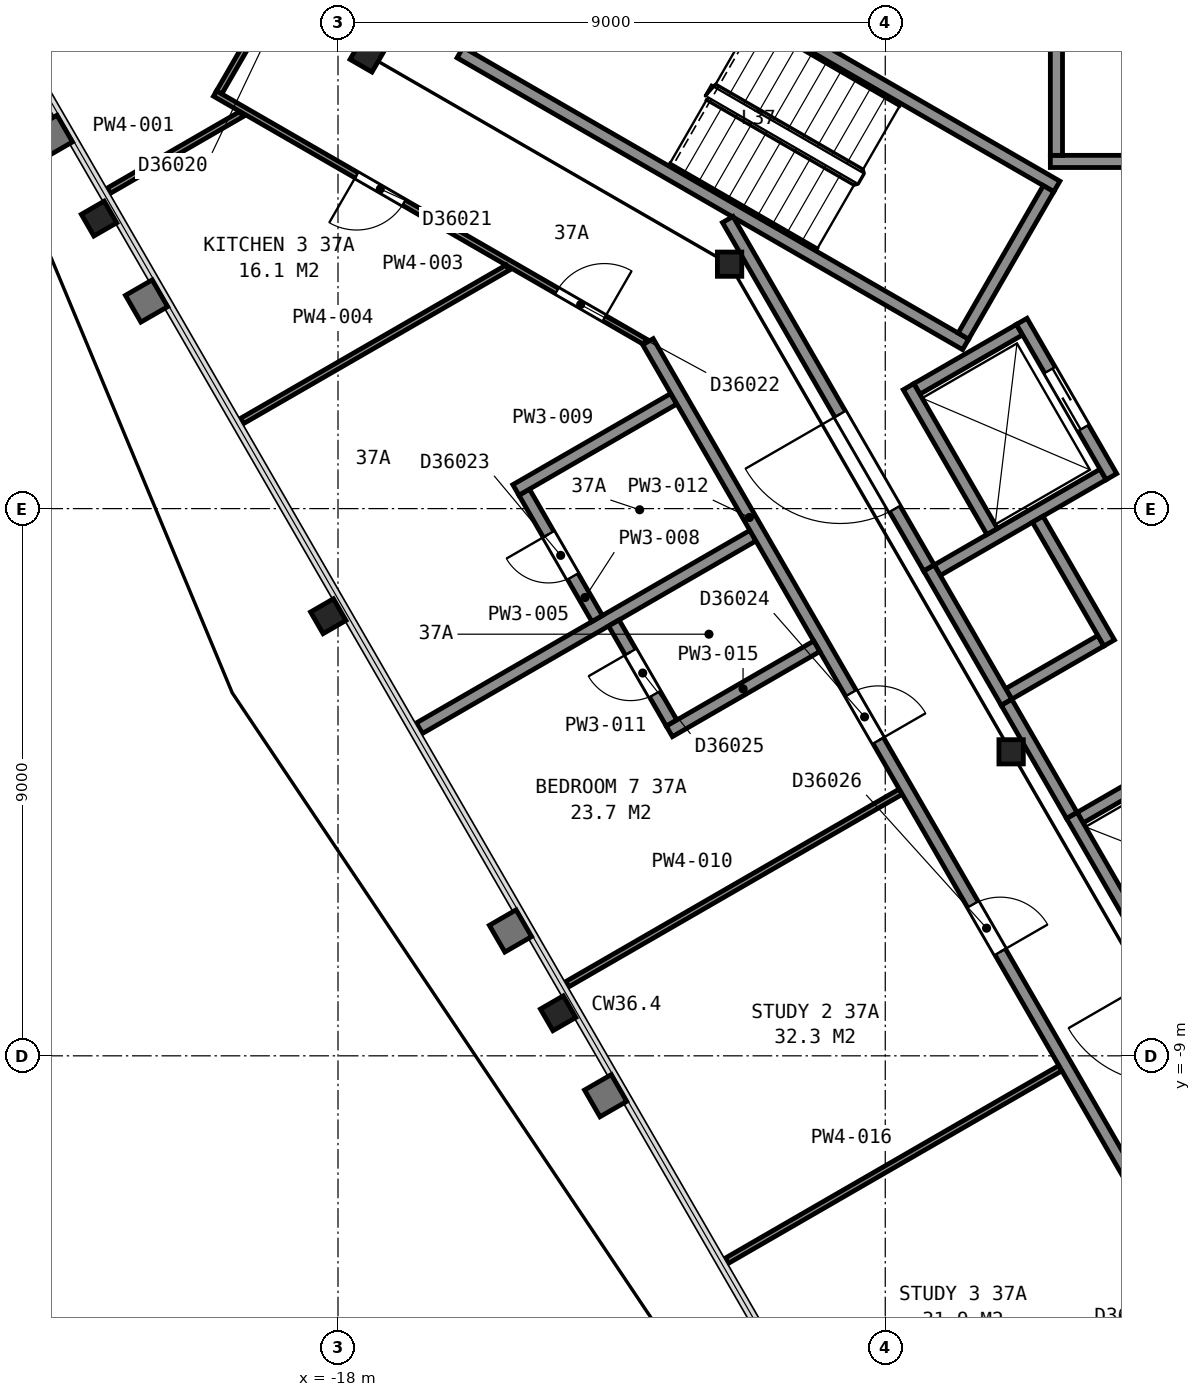
"""IFC4 building model, lengths in metres.
Left out: names, types, materials, properties, quantities, classifications, styles, units other than length and angle.
Written with IfcOpenShell. Run it as: python <this file> out.ifc"""

import sys

from ifc_helpers import new_model, si_unit, direction, frame, frame_2d, origin, origin_2d, place, context, subcontext, project, spatial, rectangle, i_section, extrude, element, fill, save


model = new_model("IFC4")
c1 = context("Model", 3, precision=1e-05, world=origin(), true_north=direction((0.0, 1.0)))
c2 = subcontext(c1, "Body", "Model", "MODEL_VIEW")
j1 = project(units=[si_unit("LENGTHUNIT", "METRE"), si_unit("PLANEANGLEUNIT", "RADIAN")], contexts=[c1])
p1 = place(None, origin())
s1 = spatial("IfcSite", under=j1, at=p1, CompositionType="ELEMENT")
p2 = place(p1, origin())
s2 = spatial("IfcBuilding", under=s1, at=p2, CompositionType="ELEMENT")
p3 = place(p2, frame((0.0, 0.0, 152.5)))
s3 = spatial("IfcBuildingStorey", under=s2, at=p3, CompositionType="ELEMENT", Elevation=152.5)
p4 = place(p3, frame((-21.93, 4.77, 0.0), z_axis=(0.0, 0.0, 1.0), x_axis=(-0.5, 0.866025403784, 0.0)))
e1 = element("IfcColumn", 1, at=p4, inside=s3, PredefinedType="COLUMN", context=c2, shape_type="SweptSolid", body=[
    extrude(i_section(OverallWidth=0.411, OverallDepth=0.434, WebThickness=0.036, FlangeThickness=0.057, FilletRadius=0.015, at=origin_2d()), origin(), (0.0, 0.0, 1.0), 3.66),
])
for number, where, z_axis, x_axis in (
    (2, (-18.16, -1.77, 0.0), (0.0, 0.0, 1.0), (-0.5, 0.866, 0.0)),
    (3, (-14.38, -8.3, 0.0), (0.0, 0.0, 1.0), (-0.5, 0.866, 0.0)),
):
    element("IfcColumn", number, at=place(p3, frame(where, z_axis=z_axis, x_axis=x_axis)), inside=s3, PredefinedType="COLUMN", context=c2, shape_type="SweptSolid", body=[
        extrude(i_section(OverallWidth=0.411, OverallDepth=0.434, WebThickness=0.036, FlangeThickness=0.057, FilletRadius=0.015, at=origin_2d()), origin(), (0.0, 0.0, 1.0), 3.665),
    ])
p5 = place(p3, frame((-17.52, 7.46, 0.0), z_axis=(0.0, 0.0, 1.0), x_axis=(0.5, 0.866025403784, 0.0)))
e4 = element("IfcColumn", 4, at=p5, inside=s3, PredefinedType="COLUMN", context=c2, shape_type="SweptSolid", body=[
    extrude(i_section(OverallWidth=0.406, OverallDepth=0.417, WebThickness=0.03, FlangeThickness=0.048, FilletRadius=0.015, at=origin_2d()), origin(), (0.0, 0.0, 1.0), 3.7),
])
for number, where, z_axis, x_axis in (
    (5, (-11.56, 4.02, 0.0), (0.0, 0.0, 1.0), (1.0, 0.0, 0.0)),
    (6, (-6.93, -4.0, 0.0), (0.0, 0.0, 1.0), (1.0, 0.0, 0.0)),
):
    element("IfcColumn", number, at=place(p3, frame(where, z_axis=z_axis, x_axis=x_axis)), inside=s3, PredefinedType="COLUMN", context=c2, shape_type="SweptSolid", body=[
        extrude(i_section(OverallWidth=0.401, OverallDepth=0.399, WebThickness=0.025, FlangeThickness=0.04, FilletRadius=0.015, at=origin_2d()), origin(), (0.0, 0.0, 1.0), 3.7),
    ])
p6 = place(p3, frame((-14.455, 9.962, 0.0), z_axis=(0.0, 0.0, 1.0), x_axis=(-0.500049511043, -0.865996816683, 0.0)))
e7 = element("IfcWall", 7, at=p6, inside=s3, PredefinedType="PARTITIONING", context=c2, shape_type="SweptSolid", body=[
    extrude(rectangle(XDim=2.8, YDim=0.2, at=frame_2d((1.4, 0.0))), origin(), (0.0, 0.0, 1.0), 3.45),
])
p7 = place(p6, frame((0.85, 0.0, 0.0)))
e8 = element("IfcOpeningElement", 8, at=p7, cuts=e7, PredefinedType="OPENING", context=c2, shape_type="SweptSolid", body=[
    extrude(rectangle(XDim=1.1, YDim=2.1, at=frame_2d((0.55, 1.05))), frame((0.0, 0.11, 0.0), z_axis=(0.0, -1.0, 0.0), x_axis=(1.0, 0.0, 0.0)), (0.0, 0.0, 1.0), 0.22),
])
for number, where, z_axis, x_axis in (
    (9, (-7.678, 2.701, 0.0), (0.0, 0.0, 1.0), (-0.866, 0.5, 0.0)),
    (10, (-6.178, 5.299, 0.0), (0.0, 0.0, 1.0), (-0.866, 0.5, 0.0)),
):
    element("IfcWall", number, at=place(p3, frame(where, z_axis=z_axis, x_axis=x_axis)), inside=s3, PredefinedType="PARTITIONING", context=c2, shape_type="SweptSolid", body=[
        extrude(rectangle(XDim=9.6, YDim=0.2, at=frame_2d((4.8, 0.0))), origin(), (0.0, 0.0, 1.0), 3.45),
    ])
p8 = place(p3, frame((-6.315, 5.262, 0.0), z_axis=(0.0, 0.0, 1.0), x_axis=(-0.500049511043, -0.865996816683, 0.0)))
e11 = element("IfcWall", 11, at=p8, inside=s3, PredefinedType="PARTITIONING", context=c2, shape_type="SweptSolid", body=[
    extrude(rectangle(XDim=2.8, YDim=0.2, at=frame_2d((1.4, 0.0))), origin(), (0.0, 0.0, 1.0), 3.45),
])
p9 = place(p3, frame((-6.285, 5.71, 0.0), z_axis=(0.0, 0.0, 1.0), x_axis=(1.0, 0.0, 0.0)))
e12 = element("IfcWall", 12, at=p9, inside=s3, PredefinedType="PARTITIONING", context=c2, shape_type="SweptSolid", body=[
    extrude(rectangle(XDim=2.35, YDim=0.2, at=frame_2d((1.175, 0.0))), origin(), (0.0, 0.0, 1.0), 3.7),
])
for number, where, z_axis, x_axis in (
    (13, (-5.795, -5.083, 0.0), (0.0, 0.0, 1.0), (0.866, 0.5, 0.0)),
    (14, (-6.97, -3.048, 0.0), (0.0, 0.0, 1.0), (0.866, 0.5, 0.0)),
):
    element("IfcWall", number, at=place(p3, frame(where, z_axis=z_axis, x_axis=x_axis)), inside=s3, PredefinedType="PARTITIONING", context=c2, shape_type="SweptSolid", body=[
        extrude(rectangle(XDim=1.75, YDim=0.2, at=frame_2d((0.875, 0.0))), origin(), (0.0, 0.0, 1.0), 3.7),
    ])
p10 = place(p3, frame((-8.145, -1.013, 0.0), z_axis=(0.0, 0.0, 1.0), x_axis=(0.866016494683, 0.500015430699, 0.0)))
e15 = element("IfcWall", 15, at=p10, inside=s3, PredefinedType="PARTITIONING", context=c2, shape_type="SweptSolid", body=[
    extrude(rectangle(XDim=3.15, YDim=0.2, at=frame_2d((1.575, 0.0))), origin(), (0.0, 0.0, 1.0), 3.7),
])
p11 = place(p3, frame((-8.48, 1.969, 0.0), z_axis=(0.0, 0.0, 1.0), x_axis=(0.866000020948, 0.500043961785, 0.0)))
e16 = element("IfcWall", 16, at=p11, inside=s3, PredefinedType="PARTITIONING", context=c2, shape_type="SweptSolid", body=[
    extrude(rectangle(XDim=1.95, YDim=0.2, at=frame_2d((0.975, 0.0))), origin(), (0.0, 0.0, 1.0), 3.7),
])
p12 = place(p3, frame((-6.185, 5.81, 0.0), z_axis=(0.0, 0.0, 1.0), x_axis=(0.0, 1.0, 0.0)))
e17 = element("IfcWall", 17, at=p12, inside=s3, PredefinedType="PARTITIONING", context=c2, shape_type="SweptSolid", body=[
    extrude(rectangle(XDim=1.75, YDim=0.2, at=frame_2d((0.875, 0.0))), origin(), (0.0, 0.0, 1.0), 3.7),
])
p13 = place(p3, frame((-5.28, 0.525, 0.0), z_axis=(0.0, 0.0, 1.0), x_axis=(-0.500037662692, 0.866003658127, 0.0)))
e18 = element("IfcWall", 18, at=p13, inside=s3, PredefinedType="PARTITIONING", context=c2, shape_type="SweptSolid", body=[
    extrude(rectangle(XDim=2.95, YDim=0.2, at=frame_2d((1.475, 0.0))), origin(), (0.0, 0.0, 1.0), 3.7),
])
p14 = place(p13, frame((0.925, 0.0, 0.0)))
e19 = element("IfcOpeningElement", 19, at=p14, cuts=e18, PredefinedType="OPENING", context=c2, shape_type="SweptSolid", body=[
    extrude(rectangle(XDim=1.1, YDim=2.1, at=frame_2d((0.55, 1.05))), frame((0.0, 0.11, 0.0), z_axis=(0.0, -1.0, 0.0), x_axis=(1.0, 0.0, 0.0)), (0.0, 0.0, 1.0), 0.22),
])
p15 = place(p3, frame((-5.318, -2.21, 0.0), z_axis=(0.0, 0.0, 1.0), x_axis=(-0.499938297808, 0.866061024631, 0.0)))
e20 = element("IfcWall", 20, at=p15, inside=s3, PredefinedType="PARTITIONING", context=c2, shape_type="SweptSolid", body=[
    extrude(rectangle(XDim=2.35, YDim=0.2, at=frame_2d((1.175, 0.0))), origin(), (0.0, 0.0, 1.0), 3.7),
])
p16 = place(p3, frame((-7.242, -0.376, 0.0), z_axis=(0.0, 0.0, 1.0), x_axis=(-0.499996545922, 0.866027397988, 0.0)))
e21 = element("IfcWall", 21, at=p16, inside=s3, PredefinedType="PARTITIONING", context=c2, shape_type="SweptSolid", body=[
    extrude(rectangle(XDim=2.75, YDim=0.2, at=frame_2d((1.375, 0.0))), origin(), (0.0, 0.0, 1.0), 3.7),
])
for number, where, z_axis, x_axis in (
    (22, (-4.656, -7.255, 0.0), (0.0, 0.0, 1.0), (-0.5, 0.866, 0.0)),
    (23, (-7.006, -3.185, 0.0), (0.0, 0.0, 1.0), (-0.5, 0.866, 0.0)),
):
    element("IfcWall", number, at=place(p3, frame(where, z_axis=z_axis, x_axis=x_axis)), inside=s3, PredefinedType="PARTITIONING", context=c2, shape_type="SweptSolid", body=[
        extrude(rectangle(XDim=2.55, YDim=0.2, at=frame_2d((1.275, 0.0))), origin(), (0.0, 0.0, 1.0), 3.7),
    ])
p17 = place(p3, frame((-11.591, 4.755, 0.0), z_axis=(0.0, 0.0, 1.0), x_axis=(0.500043977787, -0.866000011708, 0.0)))
e24 = element("IfcWall", 24, at=p17, inside=s3, PredefinedType="PARTITIONING", context=c2, shape_type="SweptSolid", body=[
    extrude(rectangle(XDim=6.617, YDim=0.2, at=frame_2d((3.308, 0.0))), origin(), (0.0, 0.0, 1.0), 3.45),
])
p18 = place(p17, frame((3.695, 0.0, 0.0)))
e25 = element("IfcOpeningElement", 25, at=p18, cuts=e24, PredefinedType="OPENING", context=c2, shape_type="SweptSolid", body=[
    extrude(rectangle(XDim=1.8, YDim=2.1, at=frame_2d((0.9, 1.05))), frame((0.0, 0.11, 0.0), z_axis=(0.0, -1.0, 0.0), x_axis=(1.0, 0.0, 0.0)), (0.0, 0.0, 1.0), 0.22),
])
p19 = place(p3, frame((-7.005, -3.187, 0.0), z_axis=(0.0, 0.0, 1.0), x_axis=(0.499689606989, -0.866204535123, 0.0)))
e26 = element("IfcWall", 26, at=p19, inside=s3, PredefinedType="PARTITIONING", context=c2, shape_type="SweptSolid", body=[
    extrude(rectangle(XDim=2.145, YDim=0.2, at=frame_2d((1.072, 0.0))), origin(), (0.0, 0.0, 1.0), 3.45),
])
p20 = place(p3, frame((-21.767, 5.23, 0.0), z_axis=(0.0, 0.0, 1.0), x_axis=(0.865868809172, 0.50027113179, 0.0)))
e27 = element("IfcWall", 27, at=p20, inside=s3, PredefinedType="PARTITIONING", context=c2, shape_type="SweptSolid", body=[
    extrude(rectangle(XDim=2.516, YDim=0.1, at=frame_2d((1.258, 0.0))), origin(), (0.0, 0.0, 1.0), 2.713),
])
p21 = place(p3, frame((-19.955, 6.844, 0.0), z_axis=(0.0, 0.0, 1.0), x_axis=(0.500422653123, 0.865781247337, 0.0)))
e28 = element("IfcWall", 28, at=p21, inside=s3, PredefinedType="PARTITIONING", context=c2, shape_type="SweptSolid", body=[
    extrude(rectangle(XDim=8.047, YDim=0.1, at=frame_2d((4.024, 0.0))), origin(), (0.0, 0.0, 1.0), 2.713),
])
p22 = place(p21, frame((3.45, 0.0, 0.0)))
e29 = element("IfcOpeningElement", 29, at=p22, cuts=e28, PredefinedType="OPENING", context=c2, shape_type="SweptSolid", body=[
    extrude(rectangle(XDim=1.2, YDim=2.1, at=frame_2d((0.6, 1.05))), frame((0.0, 0.06, 0.0), z_axis=(0.0, -1.0, 0.0), x_axis=(1.0, 0.0, 0.0)), (0.0, 0.0, 1.0), 0.12),
])
p23 = place(p3, frame((-12.952, 2.744, 0.0), z_axis=(0.0, 0.0, 1.0), x_axis=(-0.86608949446, 0.499888975259, 0.0)))
e30 = element("IfcWall", 30, at=p23, inside=s3, PredefinedType="PARTITIONING", context=c2, shape_type="SweptSolid", body=[
    extrude(rectangle(XDim=8.165, YDim=0.1, at=frame_2d((4.083, 0.0))), origin(), (0.0, 0.0, 1.0), 2.713),
])
p24 = place(p23, frame((4.576, 0.0, 0.0)))
e31 = element("IfcOpeningElement", 31, at=p24, cuts=e30, PredefinedType="OPENING", context=c2, shape_type="SweptSolid", body=[
    extrude(rectangle(XDim=0.9, YDim=2.1, at=frame_2d((0.45, 1.05))), frame((0.0, 0.06, 0.0), z_axis=(0.0, -1.0, 0.0), x_axis=(1.0, 0.0, 0.0)), (0.0, 0.0, 1.0), 0.12),
])
p25 = place(p23, frame((0.772, 0.0, 0.0)))
e32 = element("IfcOpeningElement", 32, at=p25, cuts=e30, PredefinedType="OPENING", context=c2, shape_type="SweptSolid", body=[
    extrude(rectangle(XDim=0.9, YDim=2.1, at=frame_2d((0.45, 1.05))), frame((0.0, 0.06, 0.0), z_axis=(0.0, -1.0, 0.0), x_axis=(1.0, 0.0, 0.0)), (0.0, 0.0, 1.0), 0.12),
])
p26 = place(p3, frame((-19.579, 1.441, 0.0), z_axis=(0.0, 0.0, 1.0), x_axis=(0.866033235887, 0.499986434155, 0.0)))
e33 = element("IfcWall", 33, at=p26, inside=s3, PredefinedType="PARTITIONING", context=c2, shape_type="SweptSolid", body=[
    extrude(rectangle(XDim=5.044, YDim=0.1, at=frame_2d((2.522, 0.0))), origin(), (0.0, 0.0, 1.0), 2.713),
])
p27 = place(p3, frame((-16.662, -3.612, 0.0), z_axis=(0.0, 0.0, 1.0), x_axis=(0.866030886774, 0.499990503064, 0.0)))
e34 = element("IfcWall", 34, at=p27, inside=s3, PredefinedType="PARTITIONING", context=c2, shape_type="SweptSolid", body=[
    extrude(rectangle(XDim=6.333, YDim=0.2, at=frame_2d((3.167, 0.0))), origin(), (0.0, 0.0, 1.0), 2.713),
])
p28 = place(p3, frame((-14.938, 0.271, 0.0), z_axis=(0.0, 0.0, 1.0), x_axis=(0.499913221443, -0.866075499611, 0.0)))
e35 = element("IfcWall", 35, at=p28, inside=s3, PredefinedType="PARTITIONING", context=c2, shape_type="SweptSolid", body=[
    extrude(rectangle(XDim=2.4, YDim=0.2, at=frame_2d((1.2, 0.0))), origin(), (0.0, 0.0, 1.0), 2.713),
])
p29 = place(p28, frame((0.8, 0.0, 0.0)))
e36 = element("IfcOpeningElement", 36, at=p29, cuts=e35, PredefinedType="OPENING", context=c2, shape_type="SweptSolid", body=[
    extrude(rectangle(XDim=0.8, YDim=2.1, at=frame_2d((0.4, 1.05))), frame((0.0, 0.11, 0.0), z_axis=(0.0, -1.0, 0.0), x_axis=(1.0, 0.0, 0.0)), (0.0, 0.0, 1.0), 0.22),
])
p30 = place(p3, frame((-15.075, 0.307, 0.0), z_axis=(0.0, 0.0, 1.0), x_axis=(0.866134024916, 0.499811815469, 0.0)))
e37 = element("IfcWall", 37, at=p30, inside=s3, PredefinedType="PARTITIONING", context=c2, shape_type="SweptSolid", body=[
    extrude(rectangle(XDim=2.996, YDim=0.2, at=frame_2d((1.498, 0.0))), origin(), (0.0, 0.0, 1.0), 2.713),
])
p31 = place(p3, frame((-14.23, -7.823, 0.0), z_axis=(0.0, 0.0, 1.0), x_axis=(0.866021249958, 0.50000719457, 0.0)))
e38 = element("IfcWall", 38, at=p31, inside=s3, PredefinedType="PARTITIONING", context=c2, shape_type="SweptSolid", body=[
    extrude(rectangle(XDim=6.333, YDim=0.1, at=frame_2d((3.167, 0.0))), origin(), (0.0, 0.0, 1.0), 2.713),
])
p32 = place(p3, frame((-13.464, -1.882, 0.0), z_axis=(0.0, 0.0, 1.0), x_axis=(0.500007885066, -0.866020851292, 0.0)))
e39 = element("IfcWall", 39, at=p32, inside=s3, PredefinedType="PARTITIONING", context=c2, shape_type="SweptSolid", body=[
    extrude(rectangle(XDim=1.9, YDim=0.2, at=frame_2d((0.95, 0.0))), origin(), (0.0, 0.0, 1.0), 2.713),
])
p33 = place(p32, frame((0.55, 0.0, 0.0)))
e40 = element("IfcOpeningElement", 40, at=p33, cuts=e39, PredefinedType="OPENING", context=c2, shape_type="SweptSolid", body=[
    extrude(rectangle(XDim=0.8, YDim=2.1, at=frame_2d((0.4, 1.05))), frame((0.0, 0.11, 0.0), z_axis=(0.0, -1.0, 0.0), x_axis=(1.0, 0.0, 0.0)), (0.0, 0.0, 1.0), 0.22),
])
p34 = place(p3, frame((-4.075, -12.545, 0.0), z_axis=(0.0, 0.0, 1.0), x_axis=(-0.499999743747, 0.866025551732, 0.0)))
e41 = element("IfcWall", 41, at=p34, inside=s3, PredefinedType="PARTITIONING", context=c2, shape_type="SweptSolid", body=[
    extrude(rectangle(XDim=17.656, YDim=0.2, at=frame_2d((8.828, 0.0))), origin(), (0.0, 0.0, 1.0), 2.713),
])
p35 = place(p34, frame((10.08, 0.0, 0.0)))
e42 = element("IfcOpeningElement", 42, at=p35, cuts=e41, PredefinedType="OPENING", context=c2, shape_type="SweptSolid", body=[
    extrude(rectangle(XDim=0.9, YDim=2.1, at=frame_2d((0.45, 1.05))), frame((0.0, 0.11, 0.0), z_axis=(0.0, -1.0, 0.0), x_axis=(1.0, 0.0, 0.0)), (0.0, 0.0, 1.0), 0.22),
])
p36 = place(p34, frame((6.068, 0.0, 0.0)))
e43 = element("IfcOpeningElement", 43, at=p36, cuts=e41, PredefinedType="OPENING", context=c2, shape_type="SweptSolid", body=[
    extrude(rectangle(XDim=0.9, YDim=2.1, at=frame_2d((0.45, 1.05))), frame((0.0, 0.11, 0.0), z_axis=(0.0, -1.0, 0.0), x_axis=(1.0, 0.0, 0.0)), (0.0, 0.0, 1.0), 0.22),
])
p37 = place(p3, frame((-12.551, -3.664, 0.0), z_axis=(0.0, 0.0, 1.0), x_axis=(0.865909567298, 0.500200581029, 0.0)))
e44 = element("IfcWall", 44, at=p37, inside=s3, PredefinedType="PARTITIONING", context=c2, shape_type="SweptSolid", body=[
    extrude(rectangle(XDim=2.799, YDim=0.2, at=frame_2d((1.399, 0.0))), origin(), (0.0, 0.0, 1.0), 2.713),
])
p38 = place(p3, frame((-11.605, -12.37, 0.0), z_axis=(0.0, 0.0, 1.0), x_axis=(0.866017278078, 0.500014073873, 0.0)))
e45 = element("IfcWall", 45, at=p38, inside=s3, PredefinedType="PARTITIONING", context=c2, shape_type="SweptSolid", body=[
    extrude(rectangle(XDim=6.329, YDim=0.1, at=frame_2d((3.165, 0.0))), origin(), (0.0, 0.0, 1.0), 2.713),
])
p39 = place(p14, origin())
e46 = element("IfcDoor", 46, at=p39, inside=s3, OperationType="SLIDING_TO_LEFT", PredefinedType="DOOR", context=c2, shape_type="SweptSolid", body=[
    extrude(rectangle(XDim=1.1, YDim=2.1, at=frame_2d((0.55, 1.05))), frame((0.0, 0.025, 0.0), z_axis=(0.0, -1.0, 0.0), x_axis=(1.0, 0.0, 0.0)), (0.0, 0.0, 1.0), 0.05),
])
fill(e19, e46)
p40 = place(p18, origin())
e47 = element("IfcDoor", 47, at=p40, inside=s3, OperationType="DOUBLE_DOOR_SINGLE_SWING", PredefinedType="DOOR", context=c2, shape_type="SweptSolid", body=[
    extrude(rectangle(XDim=1.8, YDim=2.1, at=frame_2d((0.9, 1.05))), frame((0.0, 0.025, 0.0), z_axis=(0.0, -1.0, 0.0), x_axis=(1.0, 0.0, 0.0)), (0.0, 0.0, 1.0), 0.05),
])
fill(e25, e47)
p41 = place(p24, origin())
e48 = element("IfcDoor", 48, at=p41, inside=s3, OperationType="SINGLE_SWING_RIGHT", PredefinedType="DOOR", context=c2, shape_type="SweptSolid", body=[
    extrude(rectangle(XDim=0.9, YDim=2.1, at=frame_2d((0.45, 1.05))), frame((0.0, 0.025, 0.0), z_axis=(0.0, -1.0, 0.0), x_axis=(1.0, 0.0, 0.0)), (0.0, 0.0, 1.0), 0.05),
])
fill(e31, e48)
p42 = place(p25, origin())
e49 = element("IfcDoor", 49, at=p42, inside=s3, OperationType="SINGLE_SWING_LEFT", PredefinedType="DOOR", context=c2, shape_type="SweptSolid", body=[
    extrude(rectangle(XDim=0.9, YDim=2.1, at=frame_2d((0.45, 1.05))), frame((0.0, 0.025, 0.0), z_axis=(0.0, -1.0, 0.0), x_axis=(1.0, 0.0, 0.0)), (0.0, 0.0, 1.0), 0.05),
])
fill(e32, e49)
p43 = place(p29, origin())
e50 = element("IfcDoor", 50, at=p43, inside=s3, OperationType="SINGLE_SWING_LEFT", PredefinedType="DOOR", context=c2, shape_type="SweptSolid", body=[
    extrude(rectangle(XDim=0.8, YDim=2.1, at=frame_2d((0.4, 1.05))), frame((0.0, 0.025, 0.0), z_axis=(0.0, -1.0, 0.0), x_axis=(1.0, 0.0, 0.0)), (0.0, 0.0, 1.0), 0.05),
])
fill(e36, e50)
p44 = place(p33, origin())
e51 = element("IfcDoor", 51, at=p44, inside=s3, OperationType="SINGLE_SWING_LEFT", PredefinedType="DOOR", context=c2, shape_type="SweptSolid", body=[
    extrude(rectangle(XDim=0.8, YDim=2.1, at=frame_2d((0.4, 1.05))), frame((0.0, 0.025, 0.0), z_axis=(0.0, -1.0, 0.0), x_axis=(1.0, 0.0, 0.0)), (0.0, 0.0, 1.0), 0.05),
])
fill(e40, e51)
p45 = place(p35, origin())
e52 = element("IfcDoor", 52, at=p45, inside=s3, OperationType="SINGLE_SWING_LEFT", PredefinedType="DOOR", context=c2, shape_type="SweptSolid", body=[
    extrude(rectangle(XDim=0.9, YDim=2.1, at=frame_2d((0.45, 1.05))), frame((0.0, 0.025, 0.0), z_axis=(0.0, -1.0, 0.0), x_axis=(1.0, 0.0, 0.0)), (0.0, 0.0, 1.0), 0.05),
])
fill(e42, e52)
p46 = place(p36, origin())
e53 = element("IfcDoor", 53, at=p46, inside=s3, OperationType="SINGLE_SWING_LEFT", PredefinedType="DOOR", context=c2, shape_type="SweptSolid", body=[
    extrude(rectangle(XDim=0.9, YDim=2.1, at=frame_2d((0.45, 1.05))), frame((0.0, 0.025, 0.0), z_axis=(0.0, -1.0, 0.0), x_axis=(1.0, 0.0, 0.0)), (0.0, 0.0, 1.0), 0.05),
])
fill(e43, e53)
save(model, sys.argv[1])
